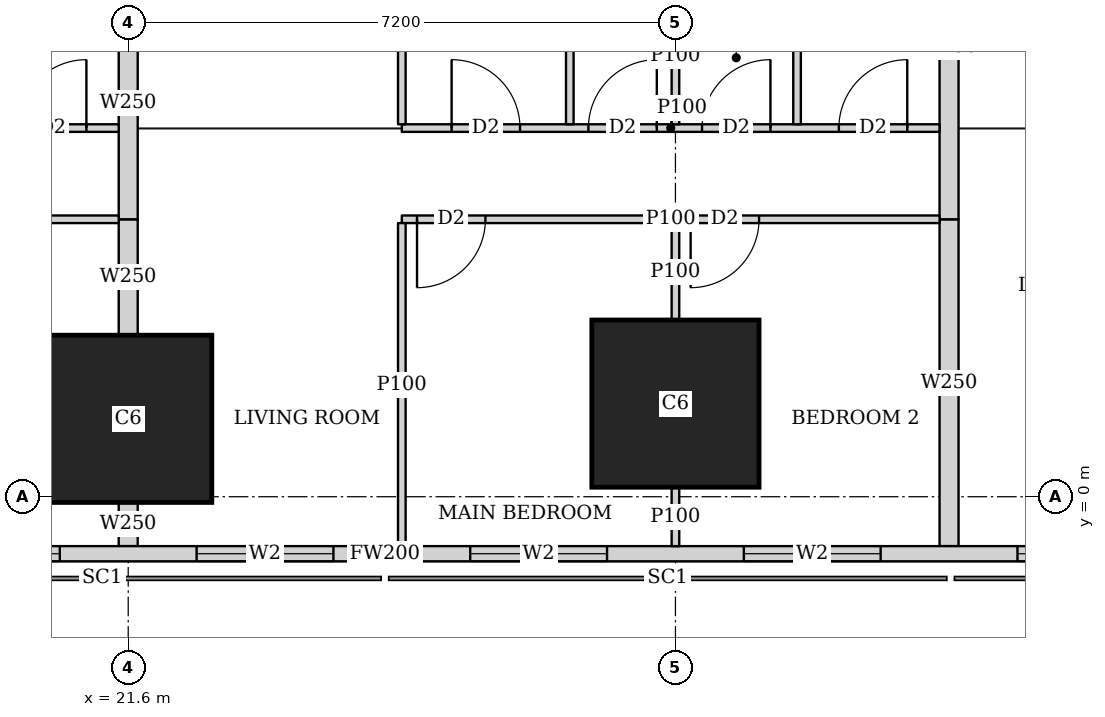
"""IFC4 building model, lengths in metres.
Left out: names, types, materials, properties, quantities, classifications, styles, units other than length and angle.
Written with IfcOpenShell. Run it as: python <this file> out.ifc"""

import sys

from ifc_helpers import new_model, si_unit, direction, frame, frame_2d, origin, origin_2d, place, context, subcontext, project, spatial, rectangle, extrude, element, fill, save


model = new_model("IFC4")
c1 = context("Model", 3, precision=1e-05, world=origin(), true_north=direction((0.0, 1.0)))
c2 = subcontext(c1, "Body", "Model", "MODEL_VIEW")
j1 = project(units=[si_unit("LENGTHUNIT", "METRE"), si_unit("PLANEANGLEUNIT", "RADIAN")], contexts=[c1])
p1 = place(None, origin())
s1 = spatial("IfcSite", under=j1, at=p1, CompositionType="ELEMENT")
p2 = place(p1, origin())
s2 = spatial("IfcBuilding", under=s1, at=p2, CompositionType="ELEMENT")
p3 = place(p2, frame((0.0, 0.0, 100.4)))
s3 = spatial("IfcBuildingStorey", under=s2, at=p3, CompositionType="ELEMENT", Elevation=100.4)
for number, where, z_axis, x_axis in (
    (1, (21.6, 1.025, 0.0), (0.0, 0.0, 1.0), (1.0, 0.0, 0.0)),
    (2, (28.8, 1.225, 0.0), (0.0, 0.0, 1.0), (1.0, 0.0, 0.0)),
):
    element("IfcColumn", number, at=place(p3, frame(where, z_axis=z_axis, x_axis=x_axis)), inside=s3, PredefinedType="COLUMN", context=c2, shape_type="SweptSolid", body=[
        extrude(rectangle(XDim=2.2, YDim=2.2, at=origin_2d()), origin(), (0.0, 0.0, 1.0), 3.75),
    ])
p4 = place(p3, frame((2.163, -0.75, 0.0), z_axis=(0.0, 0.0, 1.0), x_axis=(1.0, 0.0, 0.0)))
e3 = element("IfcWall", 3, at=p4, inside=s3, PredefinedType="SOLIDWALL", context=c2, shape_type="SweptSolid", body=[
    extrude(rectangle(XDim=45.628, YDim=0.2, at=frame_2d((22.814, 0.0))), origin(), (0.0, 0.0, 1.0), 3.5),
])
p5 = place(p4, frame((9.537, 0.0, 0.9)))
e4 = element("IfcOpeningElement", 4, at=p5, cuts=e3, PredefinedType="OPENING", context=c2, shape_type="SweptSolid", body=[
    extrude(rectangle(XDim=1.8, YDim=1.5, at=frame_2d((0.9, 0.75))), frame((0.0, 0.11, 0.0), z_axis=(0.0, -1.0, 0.0), x_axis=(1.0, 0.0, 0.0)), (0.0, 0.0, 1.0), 0.22),
])
p6 = place(p4, frame((13.137, 0.0, 0.9)))
e5 = element("IfcOpeningElement", 5, at=p6, cuts=e3, PredefinedType="OPENING", context=c2, shape_type="SweptSolid", body=[
    extrude(rectangle(XDim=1.8, YDim=1.5, at=frame_2d((0.9, 0.75))), frame((0.0, 0.11, 0.0), z_axis=(0.0, -1.0, 0.0), x_axis=(1.0, 0.0, 0.0)), (0.0, 0.0, 1.0), 0.22),
])
p7 = place(p4, frame((16.737, 0.0, 0.9)))
e6 = element("IfcOpeningElement", 6, at=p7, cuts=e3, PredefinedType="OPENING", context=c2, shape_type="SweptSolid", body=[
    extrude(rectangle(XDim=1.8, YDim=1.5, at=frame_2d((0.9, 0.75))), frame((0.0, 0.11, 0.0), z_axis=(0.0, -1.0, 0.0), x_axis=(1.0, 0.0, 0.0)), (0.0, 0.0, 1.0), 0.22),
])
p8 = place(p4, frame((20.337, 0.0, 0.9)))
e7 = element("IfcOpeningElement", 7, at=p8, cuts=e3, PredefinedType="OPENING", context=c2, shape_type="SweptSolid", body=[
    extrude(rectangle(XDim=1.8, YDim=1.5, at=frame_2d((0.9, 0.75))), frame((0.0, 0.11, 0.0), z_axis=(0.0, -1.0, 0.0), x_axis=(1.0, 0.0, 0.0)), (0.0, 0.0, 1.0), 0.22),
])
p9 = place(p4, frame((23.937, 0.0, 0.9)))
e8 = element("IfcOpeningElement", 8, at=p9, cuts=e3, PredefinedType="OPENING", context=c2, shape_type="SweptSolid", body=[
    extrude(rectangle(XDim=1.8, YDim=1.5, at=frame_2d((0.9, 0.75))), frame((0.0, 0.11, 0.0), z_axis=(0.0, -1.0, 0.0), x_axis=(1.0, 0.0, 0.0)), (0.0, 0.0, 1.0), 0.22),
])
p10 = place(p4, frame((27.537, 0.0, 0.9)))
e9 = element("IfcOpeningElement", 9, at=p10, cuts=e3, PredefinedType="OPENING", context=c2, shape_type="SweptSolid", body=[
    extrude(rectangle(XDim=1.8, YDim=1.5, at=frame_2d((0.9, 0.75))), frame((0.0, 0.11, 0.0), z_axis=(0.0, -1.0, 0.0), x_axis=(1.0, 0.0, 0.0)), (0.0, 0.0, 1.0), 0.22),
])
p11 = place(p4, frame((31.137, 0.0, 0.9)))
e10 = element("IfcOpeningElement", 10, at=p11, cuts=e3, PredefinedType="OPENING", context=c2, shape_type="SweptSolid", body=[
    extrude(rectangle(XDim=1.8, YDim=1.5, at=frame_2d((0.9, 0.75))), frame((0.0, 0.11, 0.0), z_axis=(0.0, -1.0, 0.0), x_axis=(1.0, 0.0, 0.0)), (0.0, 0.0, 1.0), 0.22),
])
p12 = place(p4, frame((34.737, 0.0, 0.9)))
e11 = element("IfcOpeningElement", 11, at=p12, cuts=e3, PredefinedType="OPENING", context=c2, shape_type="SweptSolid", body=[
    extrude(rectangle(XDim=1.8, YDim=1.5, at=frame_2d((0.9, 0.75))), frame((0.0, 0.11, 0.0), z_axis=(0.0, -1.0, 0.0), x_axis=(1.0, 0.0, 0.0)), (0.0, 0.0, 1.0), 0.22),
])
p13 = place(p3, frame((33.382, 45.65, 0.0), z_axis=(0.0, 0.0, 1.0), x_axis=(0.185593544777, -0.982626600565, 0.0)))
e12 = element("IfcWall", 12, at=p13, inside=s3, PredefinedType="SOLIDWALL", context=c2, shape_type="SweptSolid", body=[
    extrude(rectangle(XDim=47.118, YDim=0.15, at=frame_2d((23.559, 0.0))), origin(), (0.0, 0.0, 1.0), 2.2),
])
p14 = place(p13, frame((10.662, 0.0, 0.0)))
e13 = element("IfcOpeningElement", 13, at=p14, cuts=e12, PredefinedType="OPENING", context=c2, shape_type="SweptSolid", body=[
    extrude(rectangle(XDim=1.0, YDim=2.1, at=frame_2d((0.5, 1.05))), frame((0.0, 0.085, 0.0), z_axis=(0.0, -1.0, 0.0), x_axis=(1.0, 0.0, 0.0)), (0.0, 0.0, 1.0), 0.17),
])
p15 = place(p13, frame((15.237, 0.0, 0.0)))
e14 = element("IfcOpeningElement", 14, at=p15, cuts=e12, PredefinedType="OPENING", context=c2, shape_type="SweptSolid", body=[
    extrude(rectangle(XDim=1.0, YDim=2.1, at=frame_2d((0.5, 1.05))), frame((0.0, 0.085, 0.0), z_axis=(0.0, -1.0, 0.0), x_axis=(1.0, 0.0, 0.0)), (0.0, 0.0, 1.0), 0.17),
])
p16 = place(p13, frame((27.341, 0.0, 0.0)))
e15 = element("IfcOpeningElement", 15, at=p16, cuts=e12, PredefinedType="OPENING", context=c2, shape_type="SweptSolid", body=[
    extrude(rectangle(XDim=1.0, YDim=2.1, at=frame_2d((0.5, 1.05))), frame((0.0, 0.085, 0.0), z_axis=(0.0, -1.0, 0.0), x_axis=(1.0, 0.0, 0.0)), (0.0, 0.0, 1.0), 0.17),
])
p17 = place(p13, frame((33.833, 0.0, 0.0)))
e16 = element("IfcOpeningElement", 16, at=p17, cuts=e12, PredefinedType="OPENING", context=c2, shape_type="SweptSolid", body=[
    extrude(rectangle(XDim=1.0, YDim=2.1, at=frame_2d((0.5, 1.05))), frame((0.0, 0.085, 0.0), z_axis=(0.0, -1.0, 0.0), x_axis=(1.0, 0.0, 0.0)), (0.0, 0.0, 1.0), 0.17),
])
p18 = place(p3, frame((21.475, 3.65, 0.0), z_axis=(0.0, 0.0, 1.0), x_axis=(-1.0, 0.0, 0.0)))
e17 = element("IfcWall", 17, at=p18, inside=s3, PredefinedType="PARTITIONING", context=c2, shape_type="SweptSolid", body=[
    extrude(rectangle(XDim=7.075, YDim=0.1, at=frame_2d((3.538, 0.0))), origin(), (0.0, 0.0, 1.0), 3.5),
])
p19 = place(p18, frame((5.975, 0.0, 0.0)))
e18 = element("IfcOpeningElement", 18, at=p19, cuts=e17, PredefinedType="OPENING", context=c2, shape_type="SweptSolid", body=[
    extrude(rectangle(XDim=0.9, YDim=2.1, at=frame_2d((0.45, 1.05))), frame((0.0, 0.06, 0.0), z_axis=(0.0, -1.0, 0.0), x_axis=(1.0, 0.0, 0.0)), (0.0, 0.0, 1.0), 0.12),
])
p20 = place(p18, frame((2.375, 0.0, 0.0)))
e19 = element("IfcOpeningElement", 19, at=p20, cuts=e17, PredefinedType="OPENING", context=c2, shape_type="SweptSolid", body=[
    extrude(rectangle(XDim=0.9, YDim=2.1, at=frame_2d((0.45, 1.05))), frame((0.0, 0.06, 0.0), z_axis=(0.0, -1.0, 0.0), x_axis=(1.0, 0.0, 0.0)), (0.0, 0.0, 1.0), 0.12),
])
p21 = place(p3, frame((21.475, 4.85, 0.0), z_axis=(0.0, 0.0, 1.0), x_axis=(-1.0, 0.0, 0.0)))
e20 = element("IfcWall", 20, at=p21, inside=s3, PredefinedType="PARTITIONING", context=c2, shape_type="SweptSolid", body=[
    extrude(rectangle(XDim=7.075, YDim=0.1, at=frame_2d((3.538, 0.0))), origin(), (0.0, 0.0, 1.0), 3.5),
])
p22 = place(p21, frame((5.52, 0.0, 0.0)))
e21 = element("IfcOpeningElement", 21, at=p22, cuts=e20, PredefinedType="OPENING", context=c2, shape_type="SweptSolid", body=[
    extrude(rectangle(XDim=0.9, YDim=2.1, at=frame_2d((0.45, 1.05))), frame((0.0, 0.06, 0.0), z_axis=(0.0, -1.0, 0.0), x_axis=(1.0, 0.0, 0.0)), (0.0, 0.0, 1.0), 0.12),
])
p23 = place(p21, frame((2.225, 0.0, 0.0)))
e22 = element("IfcOpeningElement", 22, at=p23, cuts=e20, PredefinedType="OPENING", context=c2, shape_type="SweptSolid", body=[
    extrude(rectangle(XDim=0.9, YDim=2.1, at=frame_2d((0.45, 1.05))), frame((0.0, 0.06, 0.0), z_axis=(0.0, -1.0, 0.0), x_axis=(1.0, 0.0, 0.0)), (0.0, 0.0, 1.0), 0.12),
])
p24 = place(p21, frame((3.72, 0.0, 0.0)))
e23 = element("IfcOpeningElement", 23, at=p24, cuts=e20, PredefinedType="OPENING", context=c2, shape_type="SweptSolid", body=[
    extrude(rectangle(XDim=0.9, YDim=2.1, at=frame_2d((0.45, 1.05))), frame((0.0, 0.06, 0.0), z_axis=(0.0, -1.0, 0.0), x_axis=(1.0, 0.0, 0.0)), (0.0, 0.0, 1.0), 0.12),
])
p25 = place(p21, frame((0.425, 0.0, 0.0)))
e24 = element("IfcOpeningElement", 24, at=p25, cuts=e20, PredefinedType="OPENING", context=c2, shape_type="SweptSolid", body=[
    extrude(rectangle(XDim=0.9, YDim=2.1, at=frame_2d((0.45, 1.05))), frame((0.0, 0.06, 0.0), z_axis=(0.0, -1.0, 0.0), x_axis=(1.0, 0.0, 0.0)), (0.0, 0.0, 1.0), 0.12),
])
p26 = place(p3, frame((32.275, 3.65, 0.0), z_axis=(0.0, 0.0, 1.0), x_axis=(-1.0, 0.0, 0.0)))
e25 = element("IfcWall", 25, at=p26, inside=s3, PredefinedType="PARTITIONING", context=c2, shape_type="SweptSolid", body=[
    extrude(rectangle(XDim=7.075, YDim=0.1, at=frame_2d((3.538, 0.0))), origin(), (0.0, 0.0, 1.0), 3.5),
])
p27 = place(p26, frame((5.975, 0.0, 0.0)))
e26 = element("IfcOpeningElement", 26, at=p27, cuts=e25, PredefinedType="OPENING", context=c2, shape_type="SweptSolid", body=[
    extrude(rectangle(XDim=0.9, YDim=2.1, at=frame_2d((0.45, 1.05))), frame((0.0, 0.06, 0.0), z_axis=(0.0, -1.0, 0.0), x_axis=(1.0, 0.0, 0.0)), (0.0, 0.0, 1.0), 0.12),
])
p28 = place(p26, frame((2.375, 0.0, 0.0)))
e27 = element("IfcOpeningElement", 27, at=p28, cuts=e25, PredefinedType="OPENING", context=c2, shape_type="SweptSolid", body=[
    extrude(rectangle(XDim=0.9, YDim=2.1, at=frame_2d((0.45, 1.05))), frame((0.0, 0.06, 0.0), z_axis=(0.0, -1.0, 0.0), x_axis=(1.0, 0.0, 0.0)), (0.0, 0.0, 1.0), 0.12),
])
p29 = place(p3, frame((32.275, 4.85, 0.0), z_axis=(0.0, 0.0, 1.0), x_axis=(-1.0, 0.0, 0.0)))
e28 = element("IfcWall", 28, at=p29, inside=s3, PredefinedType="PARTITIONING", context=c2, shape_type="SweptSolid", body=[
    extrude(rectangle(XDim=7.075, YDim=0.1, at=frame_2d((3.538, 0.0))), origin(), (0.0, 0.0, 1.0), 3.5),
])
p30 = place(p29, frame((5.52, 0.0, 0.0)))
e29 = element("IfcOpeningElement", 29, at=p30, cuts=e28, PredefinedType="OPENING", context=c2, shape_type="SweptSolid", body=[
    extrude(rectangle(XDim=0.9, YDim=2.1, at=frame_2d((0.45, 1.05))), frame((0.0, 0.06, 0.0), z_axis=(0.0, -1.0, 0.0), x_axis=(1.0, 0.0, 0.0)), (0.0, 0.0, 1.0), 0.12),
])
p31 = place(p29, frame((2.225, 0.0, 0.0)))
e30 = element("IfcOpeningElement", 30, at=p31, cuts=e28, PredefinedType="OPENING", context=c2, shape_type="SweptSolid", body=[
    extrude(rectangle(XDim=0.9, YDim=2.1, at=frame_2d((0.45, 1.05))), frame((0.0, 0.06, 0.0), z_axis=(0.0, -1.0, 0.0), x_axis=(1.0, 0.0, 0.0)), (0.0, 0.0, 1.0), 0.12),
])
p32 = place(p29, frame((3.72, 0.0, 0.0)))
e31 = element("IfcOpeningElement", 31, at=p32, cuts=e28, PredefinedType="OPENING", context=c2, shape_type="SweptSolid", body=[
    extrude(rectangle(XDim=0.9, YDim=2.1, at=frame_2d((0.45, 1.05))), frame((0.0, 0.06, 0.0), z_axis=(0.0, -1.0, 0.0), x_axis=(1.0, 0.0, 0.0)), (0.0, 0.0, 1.0), 0.12),
])
p33 = place(p29, frame((0.425, 0.0, 0.0)))
e32 = element("IfcOpeningElement", 32, at=p33, cuts=e28, PredefinedType="OPENING", context=c2, shape_type="SweptSolid", body=[
    extrude(rectangle(XDim=0.9, YDim=2.1, at=frame_2d((0.45, 1.05))), frame((0.0, 0.06, 0.0), z_axis=(0.0, -1.0, 0.0), x_axis=(1.0, 0.0, 0.0)), (0.0, 0.0, 1.0), 0.12),
])
p34 = place(p3, frame((25.2, -0.65, 0.0), z_axis=(0.0, 0.0, 1.0), x_axis=(0.0, 1.0, 0.0)))
e33 = element("IfcWall", 33, at=p34, inside=s3, PredefinedType="PARTITIONING", context=c2, shape_type="SweptSolid", body=[
    extrude(rectangle(XDim=4.25, YDim=0.1, at=frame_2d((2.125, 0.0))), origin(), (0.0, 0.0, 1.0), 2.2),
])
p35 = place(p3, frame((28.8, -0.65, 0.0), z_axis=(0.0, 0.0, 1.0), x_axis=(0.0, 1.0, 0.0)))
e34 = element("IfcWall", 34, at=p35, inside=s3, PredefinedType="PARTITIONING", context=c2, shape_type="SweptSolid", body=[
    extrude(rectangle(XDim=0.774, YDim=0.1, at=frame_2d((0.387, 0.0))), origin(), (0.0, 0.0, 1.0), 3.5),
])
p36 = place(p3, frame((28.8, 2.326, 0.0), z_axis=(0.0, 0.0, 1.0), x_axis=(0.0, 1.0, 0.0)))
e35 = element("IfcWall", 35, at=p36, inside=s3, PredefinedType="PARTITIONING", context=c2, shape_type="SweptSolid", body=[
    extrude(rectangle(XDim=1.274, YDim=0.1, at=frame_2d((0.637, 0.0))), origin(), (0.0, 0.0, 1.0), 3.5),
])
p37 = place(p3, frame((25.2, 4.9, 0.0), z_axis=(0.0, 0.0, 1.0), x_axis=(0.0, 1.0, 0.0)))
e36 = element("IfcWall", 36, at=p37, inside=s3, PredefinedType="PARTITIONING", context=c2, shape_type="SweptSolid", body=[
    extrude(rectangle(XDim=3.275, YDim=0.1, at=frame_2d((1.638, 0.0))), origin(), (0.0, 0.0, 1.0), 3.5),
])
p38 = place(p3, frame((28.8, 4.9, 0.0), z_axis=(0.0, 0.0, 1.0), x_axis=(0.0, 1.0, 0.0)))
e37 = element("IfcWall", 37, at=p38, inside=s3, PredefinedType="PARTITIONING", context=c2, shape_type="SweptSolid", body=[
    extrude(rectangle(XDim=1.799, YDim=0.1, at=frame_2d((0.899, 0.0))), origin(), (0.0, 0.0, 1.0), 3.5),
])
for number, where, z_axis, x_axis in (
    (38, (27.41, 4.9, 0.0), (0.0, 0.0, 1.0), (0.0, 1.0, 0.0)),
    (39, (30.4, 4.9, 0.0), (0.0, 0.0, 1.0), (0.0, 1.0, 0.0)),
):
    element("IfcWall", number, at=place(p3, frame(where, z_axis=z_axis, x_axis=x_axis)), inside=s3, PredefinedType="PARTITIONING", context=c2, shape_type="SweptSolid", body=[
        extrude(rectangle(XDim=3.275, YDim=0.1, at=frame_2d((1.638, 0.0))), origin(), (0.0, 0.0, 1.0), 3.5),
    ])
p39 = place(p3, frame((21.6, -0.65, 0.0), z_axis=(0.0, 0.0, 1.0), x_axis=(0.0, 1.0, 0.0)))
e40 = element("IfcWall", 40, at=p39, inside=s3, PredefinedType="SOLIDWALL", context=c2, shape_type="SweptSolid", body=[
    extrude(rectangle(XDim=0.574, YDim=0.25, at=frame_2d((0.287, 0.0))), origin(), (0.0, 0.0, 1.0), 3.5),
])
p40 = place(p3, frame((21.6, 2.126, 0.0), z_axis=(0.0, 0.0, 1.0), x_axis=(0.0, 1.0, 0.0)))
e41 = element("IfcWall", 41, at=p40, inside=s3, PredefinedType="SOLIDWALL", context=c2, shape_type="SweptSolid", body=[
    extrude(rectangle(XDim=1.524, YDim=0.25, at=frame_2d((0.762, 0.0))), origin(), (0.0, 0.0, 1.0), 3.5),
])
p41 = place(p3, frame((21.6, 3.65, 0.0), z_axis=(0.0, 0.0, 1.0), x_axis=(0.0, 1.0, 0.0)))
e42 = element("IfcWall", 42, at=p41, inside=s3, PredefinedType="SOLIDWALL", context=c2, shape_type="SweptSolid", body=[
    extrude(rectangle(XDim=3.049, YDim=0.25, at=frame_2d((1.524, 0.0))), origin(), (0.0, 0.0, 1.0), 3.5),
])
p42 = place(p3, frame((32.4, -0.65, 0.0), z_axis=(0.0, 0.0, 1.0), x_axis=(0.0, 1.0, 0.0)))
e43 = element("IfcWall", 43, at=p42, inside=s3, PredefinedType="SOLIDWALL", context=c2, shape_type="SweptSolid", body=[
    extrude(rectangle(XDim=4.3, YDim=0.25, at=frame_2d((2.15, 0.0))), origin(), (0.0, 0.0, 1.0), 2.2),
])
p43 = place(p3, frame((32.4, 3.65, 0.0), z_axis=(0.0, 0.0, 1.0), x_axis=(0.0, 1.0, 0.0)))
e44 = element("IfcWall", 44, at=p43, inside=s3, PredefinedType="SOLIDWALL", context=c2, shape_type="SweptSolid", body=[
    extrude(rectangle(XDim=4.525, YDim=0.25, at=frame_2d((2.263, 0.0))), origin(), (0.0, 0.0, 1.0), 3.5),
])
p44 = place(p7, origin())
e45 = element("IfcWindow", 45, at=p44, inside=s3, PartitioningType="SINGLE_PANEL", PredefinedType="WINDOW", context=c2, shape_type="SweptSolid", body=[
    extrude(rectangle(XDim=1.8, YDim=1.5, at=frame_2d((0.9, 0.75))), frame((0.0, 0.03, 0.0), z_axis=(0.0, -1.0, 0.0), x_axis=(1.0, 0.0, 0.0)), (0.0, 0.0, 1.0), 0.06),
])
fill(e6, e45)
p45 = place(p8, origin())
e46 = element("IfcWindow", 46, at=p45, inside=s3, PartitioningType="SINGLE_PANEL", PredefinedType="WINDOW", context=c2, shape_type="SweptSolid", body=[
    extrude(rectangle(XDim=1.8, YDim=1.5, at=frame_2d((0.9, 0.75))), frame((0.0, 0.03, 0.0), z_axis=(0.0, -1.0, 0.0), x_axis=(1.0, 0.0, 0.0)), (0.0, 0.0, 1.0), 0.06),
])
fill(e7, e46)
p46 = place(p9, origin())
e47 = element("IfcWindow", 47, at=p46, inside=s3, PartitioningType="SINGLE_PANEL", PredefinedType="WINDOW", context=c2, shape_type="SweptSolid", body=[
    extrude(rectangle(XDim=1.8, YDim=1.5, at=frame_2d((0.9, 0.75))), frame((0.0, 0.03, 0.0), z_axis=(0.0, -1.0, 0.0), x_axis=(1.0, 0.0, 0.0)), (0.0, 0.0, 1.0), 0.06),
])
fill(e8, e47)
p47 = place(p10, origin())
e48 = element("IfcWindow", 48, at=p47, inside=s3, PartitioningType="SINGLE_PANEL", PredefinedType="WINDOW", context=c2, shape_type="SweptSolid", body=[
    extrude(rectangle(XDim=1.8, YDim=1.5, at=frame_2d((0.9, 0.75))), frame((0.0, 0.03, 0.0), z_axis=(0.0, -1.0, 0.0), x_axis=(1.0, 0.0, 0.0)), (0.0, 0.0, 1.0), 0.06),
])
fill(e9, e48)
p48 = place(p11, origin())
e49 = element("IfcWindow", 49, at=p48, inside=s3, PartitioningType="SINGLE_PANEL", PredefinedType="WINDOW", context=c2, shape_type="SweptSolid", body=[
    extrude(rectangle(XDim=1.8, YDim=1.5, at=frame_2d((0.9, 0.75))), frame((0.0, 0.03, 0.0), z_axis=(0.0, -1.0, 0.0), x_axis=(1.0, 0.0, 0.0)), (0.0, 0.0, 1.0), 0.06),
])
fill(e10, e49)
p49 = place(p25, origin())
e50 = element("IfcDoor", 50, at=p49, inside=s3, OperationType="SINGLE_SWING_RIGHT", PredefinedType="DOOR", context=c2, shape_type="SweptSolid", body=[
    extrude(rectangle(XDim=0.9, YDim=2.1, at=frame_2d((0.45, 1.05))), frame((0.0, 0.025, 0.0), z_axis=(0.0, -1.0, 0.0), x_axis=(1.0, 0.0, 0.0)), (0.0, 0.0, 1.0), 0.05),
])
fill(e24, e50)
p50 = place(p27, origin())
e51 = element("IfcDoor", 51, at=p50, inside=s3, OperationType="SINGLE_SWING_RIGHT", PredefinedType="DOOR", context=c2, shape_type="SweptSolid", body=[
    extrude(rectangle(XDim=0.9, YDim=2.1, at=frame_2d((0.45, 1.05))), frame((0.0, 0.025, 0.0), z_axis=(0.0, -1.0, 0.0), x_axis=(1.0, 0.0, 0.0)), (0.0, 0.0, 1.0), 0.05),
])
fill(e26, e51)
p51 = place(p28, origin())
e52 = element("IfcDoor", 52, at=p51, inside=s3, OperationType="SINGLE_SWING_RIGHT", PredefinedType="DOOR", context=c2, shape_type="SweptSolid", body=[
    extrude(rectangle(XDim=0.9, YDim=2.1, at=frame_2d((0.45, 1.05))), frame((0.0, 0.025, 0.0), z_axis=(0.0, -1.0, 0.0), x_axis=(1.0, 0.0, 0.0)), (0.0, 0.0, 1.0), 0.05),
])
fill(e27, e52)
p52 = place(p30, origin())
e53 = element("IfcDoor", 53, at=p52, inside=s3, OperationType="SINGLE_SWING_LEFT", PredefinedType="DOOR", context=c2, shape_type="SweptSolid", body=[
    extrude(rectangle(XDim=0.9, YDim=2.1, at=frame_2d((0.45, 1.05))), frame((0.0, 0.025, 0.0), z_axis=(0.0, -1.0, 0.0), x_axis=(1.0, 0.0, 0.0)), (0.0, 0.0, 1.0), 0.05),
])
fill(e29, e53)
p53 = place(p31, origin())
e54 = element("IfcDoor", 54, at=p53, inside=s3, OperationType="SINGLE_SWING_RIGHT", PredefinedType="DOOR", context=c2, shape_type="SweptSolid", body=[
    extrude(rectangle(XDim=0.9, YDim=2.1, at=frame_2d((0.45, 1.05))), frame((0.0, 0.025, 0.0), z_axis=(0.0, -1.0, 0.0), x_axis=(1.0, 0.0, 0.0)), (0.0, 0.0, 1.0), 0.05),
])
fill(e30, e54)
p54 = place(p32, origin())
e55 = element("IfcDoor", 55, at=p54, inside=s3, OperationType="SINGLE_SWING_RIGHT", PredefinedType="DOOR", context=c2, shape_type="SweptSolid", body=[
    extrude(rectangle(XDim=0.9, YDim=2.1, at=frame_2d((0.45, 1.05))), frame((0.0, 0.025, 0.0), z_axis=(0.0, -1.0, 0.0), x_axis=(1.0, 0.0, 0.0)), (0.0, 0.0, 1.0), 0.05),
])
fill(e31, e55)
p55 = place(p33, origin())
e56 = element("IfcDoor", 56, at=p55, inside=s3, OperationType="SINGLE_SWING_RIGHT", PredefinedType="DOOR", context=c2, shape_type="SweptSolid", body=[
    extrude(rectangle(XDim=0.9, YDim=2.1, at=frame_2d((0.45, 1.05))), frame((0.0, 0.025, 0.0), z_axis=(0.0, -1.0, 0.0), x_axis=(1.0, 0.0, 0.0)), (0.0, 0.0, 1.0), 0.05),
])
fill(e32, e56)
save(model, sys.argv[1])
